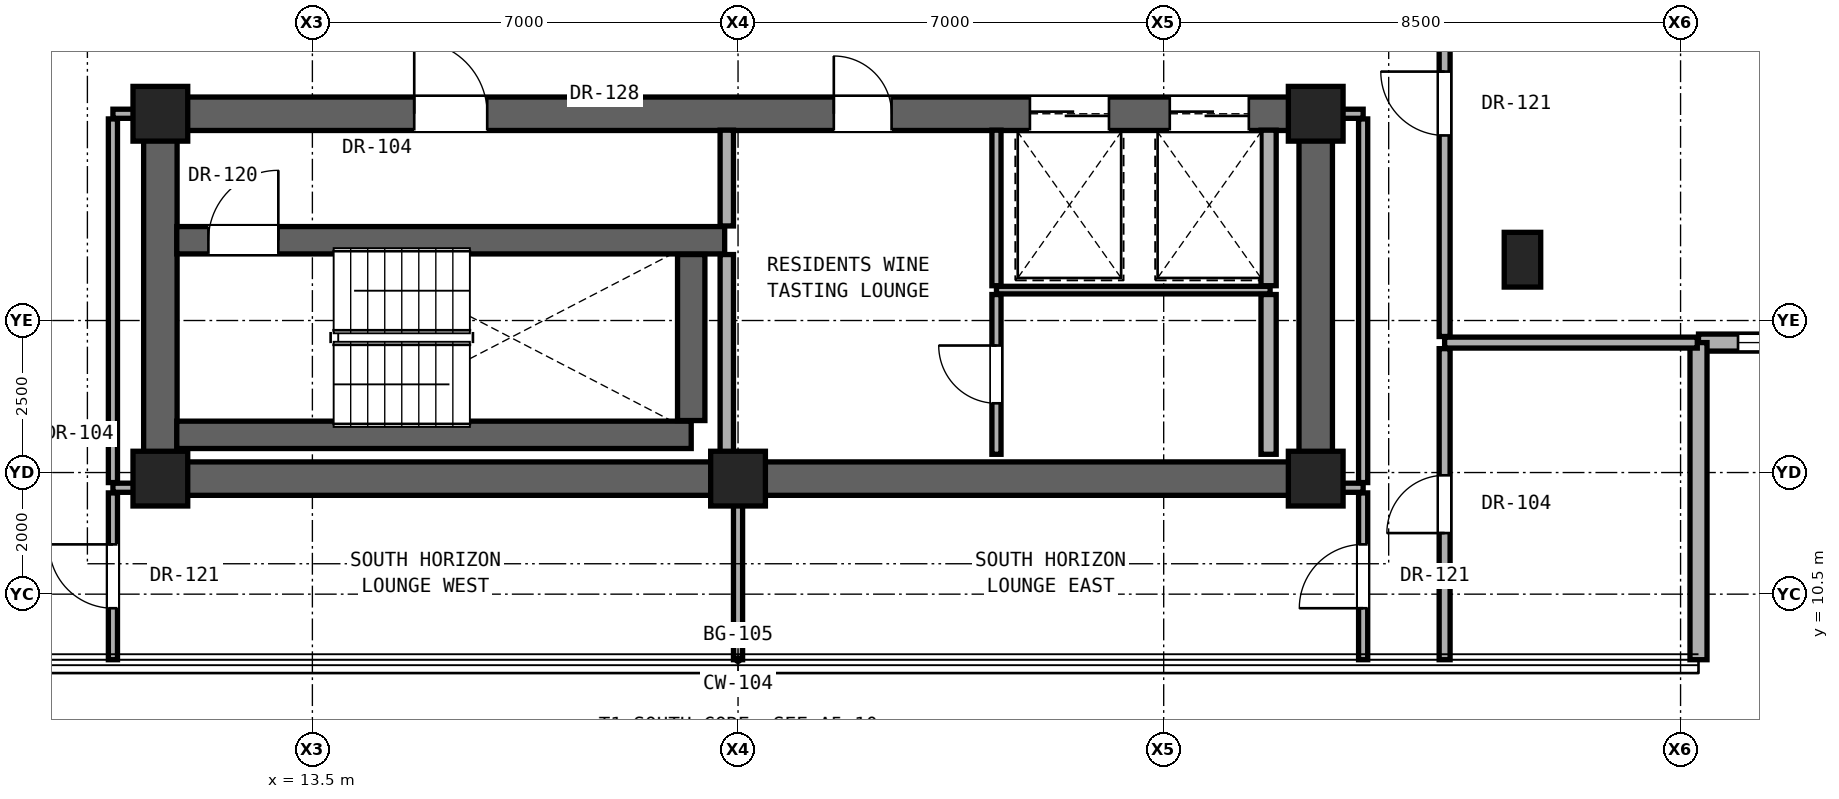
"""IFC4 building model, lengths in metres.
Left out: names, types, materials, properties, quantities, classifications, styles, units other than length and angle.
Written with IfcOpenShell. Run it as: python <this file> out.ifc"""

import sys

from ifc_helpers import new_model, si_unit, direction, frame, frame_2d, origin, origin_2d, place, context, subcontext, project, spatial, rectangle, extrude, element, fill, save


model = new_model("IFC4")
c1 = context("Model", 3, precision=1e-05, world=origin(), true_north=direction((0.0, 1.0)))
c2 = subcontext(c1, "Body", "Model", "MODEL_VIEW")
j1 = project(units=[si_unit("LENGTHUNIT", "METRE"), si_unit("PLANEANGLEUNIT", "RADIAN")], contexts=[c1])
p1 = place(None, origin())
s1 = spatial("IfcSite", under=j1, at=p1, CompositionType="ELEMENT")
p2 = place(p1, origin())
s2 = spatial("IfcBuilding", under=s1, at=p2, CompositionType="ELEMENT")
p3 = place(p2, frame((0.0, 0.0, 203.15)))
s3 = spatial("IfcBuildingStorey", under=s2, at=p3, CompositionType="ELEMENT", Elevation=203.15)
for number, where, z_axis, x_axis in (
    (1, (11.0, 12.4, 0.0), (0.0, 0.0, 1.0), (1.0, 0.0, 0.0)),
    (2, (20.5, 12.4, 0.0), (0.0, 0.0, 1.0), (1.0, 0.0, 0.0)),
    (3, (30.0, 12.4, 0.0), (0.0, 0.0, 1.0), (1.0, 0.0, 0.0)),
    (4, (11.0, 18.4, 0.0), (0.0, 0.0, 1.0), (1.0, 0.0, 0.0)),
    (5, (30.0, 18.4, 0.0), (0.0, 0.0, 1.0), (1.0, 0.0, 0.0)),
):
    element("IfcColumn", number, at=place(p3, frame(where, z_axis=z_axis, x_axis=x_axis)), inside=s3, PredefinedType="COLUMN", context=c2, shape_type="SweptSolid", body=[
        extrude(rectangle(XDim=0.9, YDim=0.9, at=origin_2d()), origin(), (0.0, 0.0, 1.0), 3.25),
    ])
p4 = place(p3, frame((33.4, 16.0, 0.0), z_axis=(0.0, 0.0, 1.0), x_axis=(1.0, 0.0, 0.0)))
e6 = element("IfcColumn", 6, at=p4, inside=s3, PredefinedType="PILASTER", context=c2, shape_type="SweptSolid", body=[
    extrude(rectangle(XDim=0.6, YDim=0.9, at=origin_2d()), origin(), (0.0, 0.0, 1.0), 3.25),
])
p5 = place(p3, frame((11.0, 12.4, 0.0), z_axis=(0.0, 0.0, 1.0), x_axis=(1.0, 0.0, 0.0)))
e7 = element("IfcWall", 7, at=p5, inside=s3, PredefinedType="SHEAR", context=c2, shape_type="SweptSolid", body=[
    extrude(rectangle(XDim=19.0, YDim=0.55, at=frame_2d((9.5, 0.0))), origin(), (0.0, 0.0, 1.0), 3.05),
])
for number, where, z_axis, x_axis in (
    (8, (11.0, 12.4, 0.0), (0.0, 0.0, 1.0), (0.0, 1.0, 0.0)),
    (9, (30.0, 12.4, 0.0), (0.0, 0.0, 1.0), (0.0, 1.0, 0.0)),
):
    element("IfcWall", number, at=place(p3, frame(where, z_axis=z_axis, x_axis=x_axis)), inside=s3, PredefinedType="SHEAR", context=c2, shape_type="SweptSolid", body=[
        extrude(rectangle(XDim=6.0, YDim=0.55, at=frame_2d((3.0, 0.0))), origin(), (0.0, 0.0, 1.0), 3.05),
    ])
p6 = place(p3, frame((11.0, 18.4, 0.0), z_axis=(0.0, 0.0, 1.0), x_axis=(1.0, 0.0, 0.0)))
e10 = element("IfcWall", 10, at=p6, inside=s3, PredefinedType="SHEAR", context=c2, shape_type="SweptSolid", body=[
    extrude(rectangle(XDim=19.0, YDim=0.55, at=frame_2d((9.5, 0.0))), origin(), (0.0, 0.0, 1.0), 3.05),
])
p7 = place(p6, frame((4.175, 0.0, 0.0)))
e11 = element("IfcOpeningElement", 11, at=p7, cuts=e10, PredefinedType="OPENING", context=c2, shape_type="SweptSolid", body=[
    extrude(rectangle(XDim=1.2, YDim=2.25, at=frame_2d((0.6, 1.125))), frame((0.0, 0.285, 0.0), z_axis=(0.0, -1.0, 0.0), x_axis=(1.0, 0.0, 0.0)), (0.0, 0.0, 1.0), 0.57),
])
p8 = place(p6, frame((11.075, 0.0, 0.0)))
e12 = element("IfcOpeningElement", 12, at=p8, cuts=e10, PredefinedType="OPENING", context=c2, shape_type="SweptSolid", body=[
    extrude(rectangle(XDim=0.95, YDim=2.15, at=frame_2d((0.475, 1.075))), frame((0.0, 0.285, 0.0), z_axis=(0.0, -1.0, 0.0), x_axis=(1.0, 0.0, 0.0)), (0.0, 0.0, 1.0), 0.57),
])
p9 = place(p6, frame((14.3, 0.0, 0.0)))
e13 = element("IfcOpeningElement", 13, at=p9, cuts=e10, PredefinedType="OPENING", context=c2, shape_type="SweptSolid", body=[
    extrude(rectangle(XDim=1.3, YDim=2.3, at=frame_2d((0.65, 1.15))), frame((0.0, 0.285, 0.0), z_axis=(0.0, -1.0, 0.0), x_axis=(1.0, 0.0, 0.0)), (0.0, 0.0, 1.0), 0.57),
])
p10 = place(p6, frame((16.6, 0.0, 0.0)))
e14 = element("IfcOpeningElement", 14, at=p10, cuts=e10, PredefinedType="OPENING", context=c2, shape_type="SweptSolid", body=[
    extrude(rectangle(XDim=1.3, YDim=2.3, at=frame_2d((0.65, 1.15))), frame((0.0, 0.285, 0.0), z_axis=(0.0, -1.0, 0.0), x_axis=(1.0, 0.0, 0.0)), (0.0, 0.0, 1.0), 0.57),
])
p11 = place(p3, frame((36.295, 14.637, 0.0), z_axis=(0.0, 0.0, 1.0), x_axis=(1.0, 0.0, 0.0)))
e15 = element("IfcWall", 15, at=p11, inside=s3, PredefinedType="SOLIDWALL", context=c2, shape_type="SweptSolid", body=[
    extrude(rectangle(XDim=5.215, YDim=0.28, at=frame_2d((2.607, 0.0))), origin(), (0.0, 0.0, 1.0), 3.03),
])
p12 = place(p11, frame((0.65, 0.0, 0.85)))
e16 = element("IfcOpeningElement", 16, at=p12, cuts=e15, PredefinedType="OPENING", context=c2, shape_type="SweptSolid", body=[
    extrude(rectangle(XDim=1.1, YDim=2.0, at=frame_2d((0.55, 1.0))), frame((0.0, 0.15, 0.0), z_axis=(0.0, -1.0, 0.0), x_axis=(1.0, 0.0, 0.0)), (0.0, 0.0, 1.0), 0.3),
])
p13 = place(p3, frame((36.295, 9.422, 0.0), z_axis=(0.0, 0.0, 1.0), x_axis=(0.0, 1.0, 0.0)))
e17 = element("IfcWall", 17, at=p13, inside=s3, PredefinedType="SOLIDWALL", context=c2, shape_type="SweptSolid", body=[
    extrude(rectangle(XDim=5.215, YDim=0.28, at=frame_2d((2.607, 0.0))), origin(), (0.0, 0.0, 1.0), 3.03),
])
for number, where, z_axis, x_axis in (
    (18, (10.22, 12.25, 0.0), (0.0, 0.0, 1.0), (1.0, 0.0, 0.0)),
    (19, (30.27, 12.25, 0.0), (0.0, 0.0, 1.0), (1.0, 0.0, 0.0)),
):
    element("IfcWall", number, at=place(p3, frame(where, z_axis=z_axis, x_axis=x_axis)), inside=s3, PredefinedType="PARTITIONING", context=c2, shape_type="SweptSolid", body=[
        extrude(rectangle(XDim=0.51, YDim=0.15, at=frame_2d((0.255, 0.0))), origin(), (0.0, 0.0, 1.0), 3.05),
    ])
p14 = place(p3, frame((11.27, 13.12, 0.0), z_axis=(0.0, 0.0, 1.0), x_axis=(1.0, 0.0, 0.0)))
e20 = element("IfcWall", 20, at=p14, inside=s3, PredefinedType="SHEAR", context=c2, shape_type="SweptSolid", body=[
    extrude(rectangle(XDim=8.46, YDim=0.45, at=frame_2d((4.23, 0.0))), origin(), (0.0, 0.0, 1.0), 3.05),
])
p15 = place(p3, frame((32.12, 14.637, 0.0), z_axis=(0.0, 0.0, 1.0), x_axis=(1.0, 0.0, 0.0)))
e21 = element("IfcWall", 21, at=p15, inside=s3, PredefinedType="PARTITIONING", context=c2, shape_type="SweptSolid", body=[
    extrude(rectangle(XDim=4.155, YDim=0.18, at=frame_2d((2.077, 0.0))), origin(), (0.0, 0.0, 1.0), 3.05),
])
p16 = place(p3, frame((24.75, 15.5, 0.0), z_axis=(0.0, 0.0, 1.0), x_axis=(1.0, 0.0, 0.0)))
e22 = element("IfcWall", 22, at=p16, inside=s3, PredefinedType="PARTITIONING", context=c2, shape_type="SweptSolid", body=[
    extrude(rectangle(XDim=4.5, YDim=0.125, at=frame_2d((2.25, 0.0))), origin(), (0.0, 0.0, 1.0), 3.05),
])
p17 = place(p3, frame((11.27, 16.32, 0.0), z_axis=(0.0, 0.0, 1.0), x_axis=(1.0, 0.0, 0.0)))
e23 = element("IfcWall", 23, at=p17, inside=s3, PredefinedType="SHEAR", context=c2, shape_type="SweptSolid", body=[
    extrude(rectangle(XDim=9.01, YDim=0.45, at=frame_2d((4.505, 0.0))), origin(), (0.0, 0.0, 1.0), 3.05),
])
p18 = place(p17, frame((0.52, 0.0, 0.0)))
e24 = element("IfcOpeningElement", 24, at=p18, cuts=e23, PredefinedType="OPENING", context=c2, shape_type="SweptSolid", body=[
    extrude(rectangle(XDim=1.15, YDim=2.2, at=frame_2d((0.575, 1.1))), frame((0.0, 0.235, 0.0), z_axis=(0.0, -1.0, 0.0), x_axis=(1.0, 0.0, 0.0)), (0.0, 0.0, 1.0), 0.47),
])
for number, where, z_axis, x_axis in (
    (25, (10.22, 18.4, 0.0), (0.0, 0.0, 1.0), (1.0, 0.0, 0.0)),
    (26, (30.27, 18.4, 0.0), (0.0, 0.0, 1.0), (1.0, 0.0, 0.0)),
):
    element("IfcWall", number, at=place(p3, frame(where, z_axis=z_axis, x_axis=x_axis)), inside=s3, PredefinedType="PARTITIONING", context=c2, shape_type="SweptSolid", body=[
        extrude(rectangle(XDim=0.51, YDim=0.15, at=frame_2d((0.255, 0.0))), origin(), (0.0, 0.0, 1.0), 2.442),
    ])
p19 = place(p3, frame((10.22, 9.422, 0.0), z_axis=(0.0, 0.0, 1.0), x_axis=(0.0, 1.0, 0.0)))
e27 = element("IfcWall", 27, at=p19, inside=s3, PredefinedType="PARTITIONING", context=c2, shape_type="SweptSolid", body=[
    extrude(rectangle(XDim=2.743, YDim=0.15, at=frame_2d((1.372, 0.0))), origin(), (0.0, 0.0, 1.0), 3.05),
])
p20 = place(p19, frame((0.846, 0.0, 0.0)))
e28 = element("IfcOpeningElement", 28, at=p20, cuts=e27, PredefinedType="OPENING", context=c2, shape_type="SweptSolid", body=[
    extrude(rectangle(XDim=1.05, YDim=2.2, at=frame_2d((0.525, 1.1))), frame((0.0, 0.085, 0.0), z_axis=(0.0, -1.0, 0.0), x_axis=(1.0, 0.0, 0.0)), (0.0, 0.0, 1.0), 0.17),
])
p21 = place(p3, frame((10.22, 12.335, 0.0), z_axis=(0.0, 0.0, 1.0), x_axis=(0.0, 1.0, 0.0)))
e29 = element("IfcWall", 29, at=p21, inside=s3, PredefinedType="PARTITIONING", context=c2, shape_type="SweptSolid", body=[
    extrude(rectangle(XDim=5.98, YDim=0.15, at=frame_2d((2.99, 0.0))), origin(), (0.0, 0.0, 1.0), 2.442),
])
p22 = place(p3, frame((19.73, 13.355, 0.0), z_axis=(0.0, 0.0, 1.0), x_axis=(0.0, 1.0, 0.0)))
e30 = element("IfcWall", 30, at=p22, inside=s3, PredefinedType="SHEAR", context=c2, shape_type="SweptSolid", body=[
    extrude(rectangle(XDim=2.73, YDim=0.45, at=frame_2d((1.365, 0.0))), origin(), (0.0, 0.0, 1.0), 3.05),
])
p23 = place(p3, frame((20.315, 12.8, 0.0), z_axis=(0.0, 0.0, 1.0), x_axis=(0.0, 1.0, 0.0)))
e31 = element("IfcWall", 31, at=p23, inside=s3, PredefinedType="SOLIDWALL", context=c2, shape_type="SweptSolid", body=[
    extrude(rectangle(XDim=3.285, YDim=0.22, at=frame_2d((1.643, 0.0))), origin(), (0.0, 0.0, 1.0), 3.05),
])
p24 = place(p3, frame((20.315, 16.555, 0.0), z_axis=(0.0, 0.0, 1.0), x_axis=(0.0, 1.0, 0.0)))
e32 = element("IfcWall", 32, at=p24, inside=s3, PredefinedType="SOLIDWALL", context=c2, shape_type="SweptSolid", body=[
    extrude(rectangle(XDim=1.575, YDim=0.22, at=frame_2d((0.788, 0.0))), origin(), (0.0, 0.0, 1.0), 3.05),
])
p25 = place(p3, frame((20.5, 9.422, 0.0), z_axis=(0.0, 0.0, 1.0), x_axis=(0.0, 1.0, 0.0)))
e33 = element("IfcWall", 33, at=p25, inside=s3, PredefinedType="PARTITIONING", context=c2, shape_type="SweptSolid", body=[
    extrude(rectangle(XDim=2.708, YDim=0.15, at=frame_2d((1.354, 0.0))), origin(), (0.0, 0.0, 1.0), 3.05),
])
p26 = place(p3, frame((24.75, 12.8, 0.0), z_axis=(0.0, 0.0, 1.0), x_axis=(0.0, 1.0, 0.0)))
e34 = element("IfcWall", 34, at=p26, inside=s3, PredefinedType="PARTITIONING", context=c2, shape_type="SweptSolid", body=[
    extrude(rectangle(XDim=2.627, YDim=0.15, at=frame_2d((1.314, 0.0))), origin(), (0.0, 0.0, 1.0), 3.05),
])
p27 = place(p26, frame((0.839, 0.0, 0.0)))
e35 = element("IfcOpeningElement", 35, at=p27, cuts=e34, PredefinedType="OPENING", context=c2, shape_type="SweptSolid", body=[
    extrude(rectangle(XDim=0.95, YDim=2.15, at=frame_2d((0.475, 1.075))), frame((0.0, 0.085, 0.0), z_axis=(0.0, -1.0, 0.0), x_axis=(1.0, 0.0, 0.0)), (0.0, 0.0, 1.0), 0.17),
])
p28 = place(p3, frame((24.75, 15.573, 0.0), z_axis=(0.0, 0.0, 1.0), x_axis=(0.0, 1.0, 0.0)))
e36 = element("IfcWall", 36, at=p28, inside=s3, PredefinedType="PARTITIONING", context=c2, shape_type="SweptSolid", body=[
    extrude(rectangle(XDim=2.557, YDim=0.15, at=frame_2d((1.279, 0.0))), origin(), (0.0, 0.0, 1.0), 3.05),
])
p29 = place(p3, frame((29.225, 12.8, 0.0), z_axis=(0.0, 0.0, 1.0), x_axis=(0.0, 1.0, 0.0)))
e37 = element("IfcWall", 37, at=p29, inside=s3, PredefinedType="SOLIDWALL", context=c2, shape_type="SweptSolid", body=[
    extrude(rectangle(XDim=2.627, YDim=0.25, at=frame_2d((1.314, 0.0))), origin(), (0.0, 0.0, 1.0), 3.05),
])
p30 = place(p3, frame((29.225, 15.573, 0.0), z_axis=(0.0, 0.0, 1.0), x_axis=(0.0, 1.0, 0.0)))
e38 = element("IfcWall", 38, at=p30, inside=s3, PredefinedType="SOLIDWALL", context=c2, shape_type="SweptSolid", body=[
    extrude(rectangle(XDim=2.557, YDim=0.25, at=frame_2d((1.279, 0.0))), origin(), (0.0, 0.0, 1.0), 3.05),
])
p31 = place(p3, frame((30.78, 9.422, 0.0), z_axis=(0.0, 0.0, 1.0), x_axis=(0.0, 1.0, 0.0)))
e39 = element("IfcWall", 39, at=p31, inside=s3, PredefinedType="PARTITIONING", context=c2, shape_type="SweptSolid", body=[
    extrude(rectangle(XDim=2.743, YDim=0.15, at=frame_2d((1.372, 0.0))), origin(), (0.0, 0.0, 1.0), 3.05),
])
p32 = place(p31, frame((0.846, 0.0, 0.0)))
e40 = element("IfcOpeningElement", 40, at=p32, cuts=e39, PredefinedType="OPENING", context=c2, shape_type="SweptSolid", body=[
    extrude(rectangle(XDim=1.05, YDim=2.2, at=frame_2d((0.525, 1.1))), frame((0.0, 0.085, 0.0), z_axis=(0.0, -1.0, 0.0), x_axis=(1.0, 0.0, 0.0)), (0.0, 0.0, 1.0), 0.17),
])
p33 = place(p3, frame((30.78, 12.335, 0.0), z_axis=(0.0, 0.0, 1.0), x_axis=(0.0, 1.0, 0.0)))
e41 = element("IfcWall", 41, at=p33, inside=s3, PredefinedType="PARTITIONING", context=c2, shape_type="SweptSolid", body=[
    extrude(rectangle(XDim=5.98, YDim=0.15, at=frame_2d((2.99, 0.0))), origin(), (0.0, 0.0, 1.0), 2.442),
])
p34 = place(p3, frame((32.12, 9.422, 0.0), z_axis=(0.0, 0.0, 1.0), x_axis=(0.0, 1.0, 0.0)))
e42 = element("IfcWall", 42, at=p34, inside=s3, PredefinedType="PARTITIONING", context=c2, shape_type="SweptSolid", body=[
    extrude(rectangle(XDim=5.115, YDim=0.18, at=frame_2d((2.558, 0.0))), origin(), (0.0, 0.0, 1.0), 3.05),
])
p35 = place(p34, frame((2.083, 0.0, 0.0)))
e43 = element("IfcOpeningElement", 43, at=p35, cuts=e42, PredefinedType="OPENING", context=c2, shape_type="SweptSolid", body=[
    extrude(rectangle(XDim=0.95, YDim=2.15, at=frame_2d((0.475, 1.075))), frame((0.0, 0.1, 0.0), z_axis=(0.0, -1.0, 0.0), x_axis=(1.0, 0.0, 0.0)), (0.0, 0.0, 1.0), 0.2),
])
p36 = place(p3, frame((32.12, 14.737, 0.0), z_axis=(0.0, 0.0, 1.0), x_axis=(0.0, 1.0, 0.0)))
e44 = element("IfcWall", 44, at=p36, inside=s3, PredefinedType="PARTITIONING", context=c2, shape_type="SweptSolid", body=[
    extrude(rectangle(XDim=7.663, YDim=0.18, at=frame_2d((3.832, 0.0))), origin(), (0.0, 0.0, 1.0), 2.442),
])
p37 = place(p36, frame((3.306, 0.0, 0.0)))
e45 = element("IfcOpeningElement", 45, at=p37, cuts=e44, PredefinedType="OPENING", context=c2, shape_type="SweptSolid", body=[
    extrude(rectangle(XDim=1.05, YDim=2.2, at=frame_2d((0.525, 1.1))), frame((0.0, 0.1, 0.0), z_axis=(0.0, -1.0, 0.0), x_axis=(1.0, 0.0, 0.0)), (0.0, 0.0, 1.0), 0.2),
])
p38 = place(p12, origin())
e46 = element("IfcWindow", 46, at=p38, inside=s3, PartitioningType="SINGLE_PANEL", PredefinedType="WINDOW", context=c2, shape_type="SweptSolid", body=[
    extrude(rectangle(XDim=1.1, YDim=2.0, at=frame_2d((0.55, 1.0))), frame((0.0, 0.03, 0.0), z_axis=(0.0, -1.0, 0.0), x_axis=(1.0, 0.0, 0.0)), (0.0, 0.0, 1.0), 0.06),
])
fill(e16, e46)
p39 = place(p7, origin())
e47 = element("IfcDoor", 47, at=p39, inside=s3, OperationType="SINGLE_SWING_LEFT", PredefinedType="DOOR", context=c2, shape_type="SweptSolid", body=[
    extrude(rectangle(XDim=1.2, YDim=2.25, at=frame_2d((0.6, 1.125))), frame((0.0, 0.025, 0.0), z_axis=(0.0, -1.0, 0.0), x_axis=(1.0, 0.0, 0.0)), (0.0, 0.0, 1.0), 0.05),
])
fill(e11, e47)
p40 = place(p18, origin())
e48 = element("IfcDoor", 48, at=p40, inside=s3, OperationType="SINGLE_SWING_RIGHT", PredefinedType="DOOR", context=c2, shape_type="SweptSolid", body=[
    extrude(rectangle(XDim=1.15, YDim=2.2, at=frame_2d((0.575, 1.1))), frame((0.0, 0.025, 0.0), z_axis=(0.0, -1.0, 0.0), x_axis=(1.0, 0.0, 0.0)), (0.0, 0.0, 1.0), 0.05),
])
fill(e24, e48)
p41 = place(p8, origin())
e49 = element("IfcDoor", 49, at=p41, inside=s3, OperationType="SINGLE_SWING_LEFT", PredefinedType="DOOR", context=c2, shape_type="SweptSolid", body=[
    extrude(rectangle(XDim=0.95, YDim=2.15, at=frame_2d((0.475, 1.075))), frame((0.0, 0.025, 0.0), z_axis=(0.0, -1.0, 0.0), x_axis=(1.0, 0.0, 0.0)), (0.0, 0.0, 1.0), 0.05),
])
fill(e12, e49)
p42 = place(p27, origin())
e50 = element("IfcDoor", 50, at=p42, inside=s3, OperationType="SINGLE_SWING_RIGHT", PredefinedType="DOOR", context=c2, shape_type="SweptSolid", body=[
    extrude(rectangle(XDim=0.95, YDim=2.15, at=frame_2d((0.475, 1.075))), frame((0.0, 0.025, 0.0), z_axis=(0.0, -1.0, 0.0), x_axis=(1.0, 0.0, 0.0)), (0.0, 0.0, 1.0), 0.05),
])
fill(e35, e50)
p43 = place(p37, origin())
e51 = element("IfcDoor", 51, at=p43, inside=s3, OperationType="SINGLE_SWING_RIGHT", PredefinedType="DOOR", context=c2, shape_type="SweptSolid", body=[
    extrude(rectangle(XDim=1.05, YDim=2.2, at=frame_2d((0.525, 1.1))), frame((0.0, 0.025, 0.0), z_axis=(0.0, -1.0, 0.0), x_axis=(1.0, 0.0, 0.0)), (0.0, 0.0, 1.0), 0.05),
])
fill(e45, e51)
p44 = place(p20, origin())
e52 = element("IfcDoor", 52, at=p44, inside=s3, OperationType="SINGLE_SWING_RIGHT", PredefinedType="DOOR", context=c2, shape_type="SweptSolid", body=[
    extrude(rectangle(XDim=1.05, YDim=2.2, at=frame_2d((0.525, 1.1))), frame((0.0, 0.025, 0.0), z_axis=(0.0, -1.0, 0.0), x_axis=(1.0, 0.0, 0.0)), (0.0, 0.0, 1.0), 0.05),
])
fill(e28, e52)
p45 = place(p32, origin())
e53 = element("IfcDoor", 53, at=p45, inside=s3, OperationType="SINGLE_SWING_LEFT", PredefinedType="DOOR", context=c2, shape_type="SweptSolid", body=[
    extrude(rectangle(XDim=1.05, YDim=2.2, at=frame_2d((0.525, 1.1))), frame((0.0, 0.025, 0.0), z_axis=(0.0, -1.0, 0.0), x_axis=(1.0, 0.0, 0.0)), (0.0, 0.0, 1.0), 0.05),
])
fill(e40, e53)
p46 = place(p35, origin())
e54 = element("IfcDoor", 54, at=p46, inside=s3, OperationType="SINGLE_SWING_LEFT", PredefinedType="DOOR", context=c2, shape_type="SweptSolid", body=[
    extrude(rectangle(XDim=0.95, YDim=2.15, at=frame_2d((0.475, 1.075))), frame((0.0, 0.025, 0.0), z_axis=(0.0, -1.0, 0.0), x_axis=(1.0, 0.0, 0.0)), (0.0, 0.0, 1.0), 0.05),
])
fill(e43, e54)
p47 = place(p9, origin())
e55 = element("IfcDoor", 55, at=p47, inside=s3, OperationType="DOUBLE_DOOR_SLIDING", PredefinedType="DOOR", context=c2, shape_type="SweptSolid", body=[
    extrude(rectangle(XDim=1.3, YDim=2.3, at=frame_2d((0.65, 1.15))), frame((0.0, 0.025, 0.0), z_axis=(0.0, -1.0, 0.0), x_axis=(1.0, 0.0, 0.0)), (0.0, 0.0, 1.0), 0.05),
])
fill(e13, e55)
p48 = place(p10, origin())
e56 = element("IfcDoor", 56, at=p48, inside=s3, OperationType="DOUBLE_DOOR_SLIDING", PredefinedType="DOOR", context=c2, shape_type="SweptSolid", body=[
    extrude(rectangle(XDim=1.3, YDim=2.3, at=frame_2d((0.65, 1.15))), frame((0.0, 0.025, 0.0), z_axis=(0.0, -1.0, 0.0), x_axis=(1.0, 0.0, 0.0)), (0.0, 0.0, 1.0), 0.05),
])
fill(e14, e56)
save(model, sys.argv[1])
